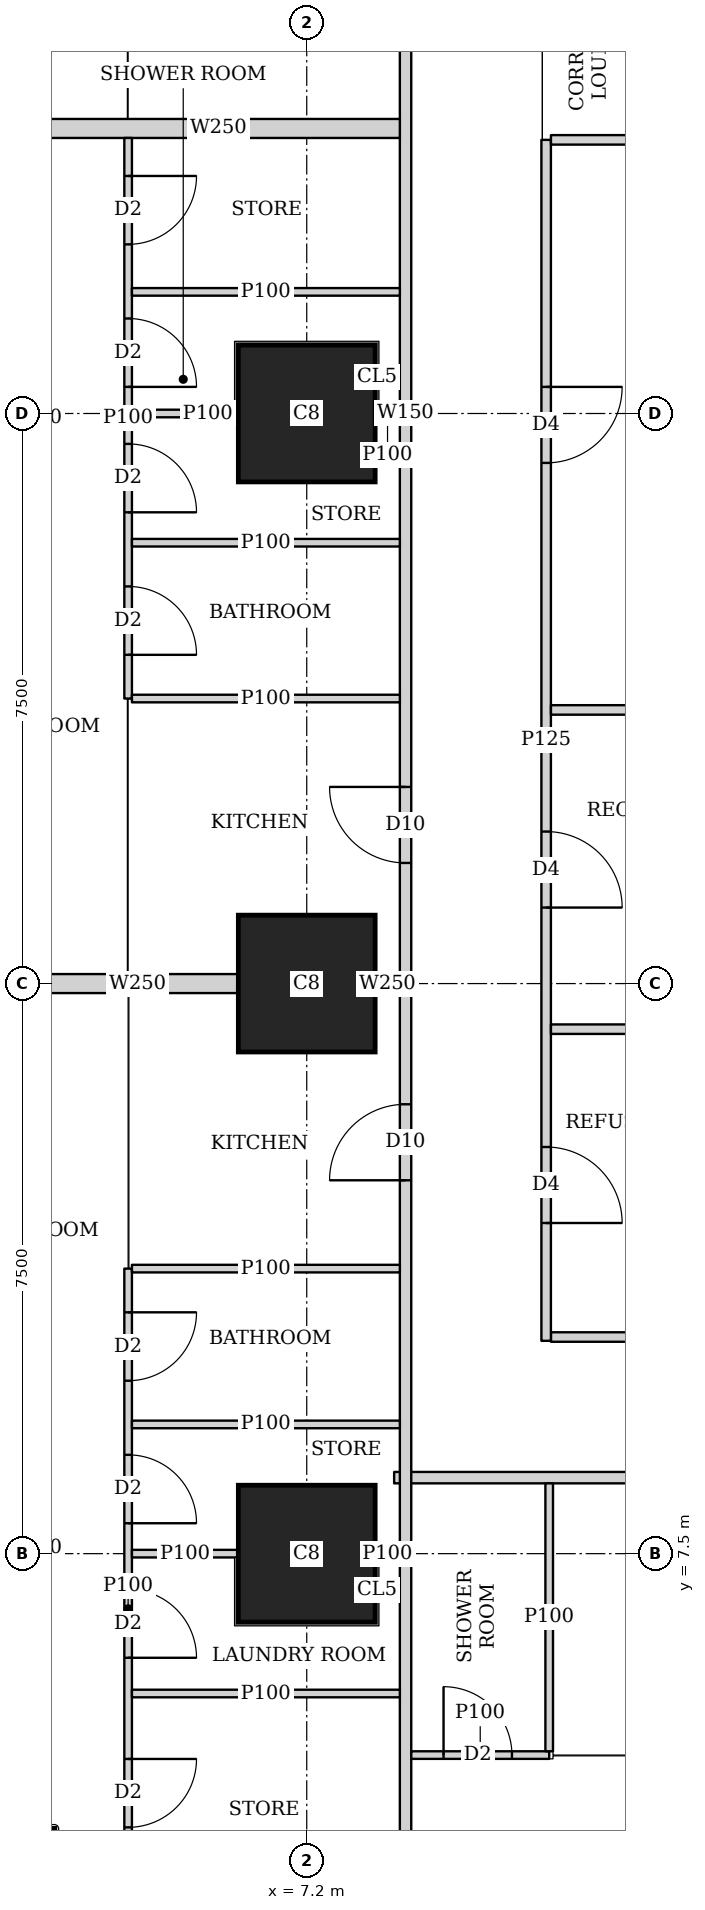
"""IFC4 building model, lengths in metres.
Left out: names, types, materials, properties, quantities, classifications, styles, units other than length and angle.
Written with IfcOpenShell. Run it as: python <this file> out.ifc"""

import sys

from ifc_helpers import new_model, si_unit, direction, frame, frame_2d, origin, origin_2d, place, context, subcontext, project, spatial, rectangle, extrude, element, fill, save


model = new_model("IFC4")
c1 = context("Model", 3, precision=1e-05, world=origin(), true_north=direction((0.0, 1.0)))
c2 = subcontext(c1, "Body", "Model", "MODEL_VIEW")
j1 = project(units=[si_unit("LENGTHUNIT", "METRE"), si_unit("PLANEANGLEUNIT", "RADIAN")], contexts=[c1])
p1 = place(None, origin())
s1 = spatial("IfcSite", under=j1, at=p1, CompositionType="ELEMENT")
p2 = place(p1, origin())
s2 = spatial("IfcBuilding", under=s1, at=p2, CompositionType="ELEMENT")
p3 = place(p2, frame((0.0, 0.0, 23.75)))
s3 = spatial("IfcBuildingStorey", under=s2, at=p3, CompositionType="ELEMENT", Elevation=23.75)
p4 = place(p3, frame((2.186, 2.186, 0.0), z_axis=(0.0, 0.0, 1.0), x_axis=(1.0, 0.0, 0.0)))
e1 = element("IfcColumn", 1, at=p4, inside=s3, PredefinedType="COLUMN", context=c2, shape_type="SweptSolid", body=[
    extrude(rectangle(XDim=3.4, YDim=3.4, at=origin_2d()), origin(), (0.0, 0.0, 1.0), 3.75),
])
for number, where, z_axis, x_axis in (
    (2, (7.2, 7.5, 0.0), (0.0, 0.0, 1.0), (1.0, 0.0, 0.0)),
    (3, (7.2, 15.0, 0.0), (0.0, 0.0, 1.0), (1.0, 0.0, 0.0)),
    (4, (7.2, 22.5, 0.0), (0.0, 0.0, 1.0), (1.0, 0.0, 0.0)),
):
    element("IfcColumn", number, at=place(p3, frame(where, z_axis=z_axis, x_axis=x_axis)), inside=s3, PredefinedType="COLUMN", context=c2, shape_type="SweptSolid", body=[
        extrude(rectangle(XDim=1.8, YDim=1.8, at=origin_2d()), origin(), (0.0, 0.0, 1.0), 3.75),
    ])
p5 = place(p3, frame((8.5, 2.626, 0.0), z_axis=(0.0, 0.0, 1.0), x_axis=(0.0, 1.0, 0.0)))
e5 = element("IfcWall", 5, at=p5, inside=s3, PredefinedType="SOLIDWALL", context=c2, shape_type="SweptSolid", body=[
    extrude(rectangle(XDim=39.773, YDim=0.15, at=frame_2d((19.886, 0.0))), origin(), (0.0, 0.0, 1.0), 2.05),
])
p6 = place(p5, frame((9.786, 0.0, 0.0)))
e6 = element("IfcOpeningElement", 6, at=p6, cuts=e5, PredefinedType="OPENING", context=c2, shape_type="SweptSolid", body=[
    extrude(rectangle(XDim=1.0, YDim=2.0, at=frame_2d((0.5, 1.0))), frame((0.0, 0.085, 0.0), z_axis=(0.0, -1.0, 0.0), x_axis=(1.0, 0.0, 0.0)), (0.0, 0.0, 1.0), 0.17),
])
p7 = place(p5, frame((13.961, 0.0, 0.0)))
e7 = element("IfcOpeningElement", 7, at=p7, cuts=e5, PredefinedType="OPENING", context=c2, shape_type="SweptSolid", body=[
    extrude(rectangle(XDim=1.0, YDim=2.0, at=frame_2d((0.5, 1.0))), frame((0.0, 0.085, 0.0), z_axis=(0.0, -1.0, 0.0), x_axis=(1.0, 0.0, 0.0)), (0.0, 0.0, 1.0), 0.17),
])
p8 = place(p5, frame((24.787, 0.0, 0.0)))
e8 = element("IfcOpeningElement", 8, at=p8, cuts=e5, PredefinedType="OPENING", context=c2, shape_type="SweptSolid", body=[
    extrude(rectangle(XDim=1.0, YDim=2.0, at=frame_2d((0.5, 1.0))), frame((0.0, 0.085, 0.0), z_axis=(0.0, -1.0, 0.0), x_axis=(1.0, 0.0, 0.0)), (0.0, 0.0, 1.0), 0.17),
])
p9 = place(p5, frame((32.287, 0.0, 0.0)))
e9 = element("IfcOpeningElement", 9, at=p9, cuts=e5, PredefinedType="OPENING", context=c2, shape_type="SweptSolid", body=[
    extrude(rectangle(XDim=1.0, YDim=2.0, at=frame_2d((0.5, 1.0))), frame((0.0, 0.085, 0.0), z_axis=(0.0, -1.0, 0.0), x_axis=(1.0, 0.0, 0.0)), (0.0, 0.0, 1.0), 0.17),
])
p10 = place(p3, frame((40.054, 8.5, 0.0), z_axis=(0.0, 0.0, 1.0), x_axis=(-1.0, 0.0, 0.0)))
e10 = element("IfcWall", 10, at=p10, inside=s3, PredefinedType="SOLIDWALL", context=c2, shape_type="SweptSolid", body=[
    extrude(rectangle(XDim=31.704, YDim=0.15, at=frame_2d((15.852, 0.0))), origin(), (0.0, 0.0, 1.0), 3.5),
])
p11 = place(p10, frame((27.321, 0.0, 0.0)))
e11 = element("IfcOpeningElement", 11, at=p11, cuts=e10, PredefinedType="OPENING", context=c2, shape_type="SweptSolid", body=[
    extrude(rectangle(XDim=1.0, YDim=2.1, at=frame_2d((0.5, 1.05))), frame((0.0, 0.085, 0.0), z_axis=(0.0, -1.0, 0.0), x_axis=(1.0, 0.0, 0.0)), (0.0, 0.0, 1.0), 0.17),
])
p12 = place(p10, frame((23.054, 0.0, 0.0)))
e12 = element("IfcOpeningElement", 12, at=p12, cuts=e10, PredefinedType="OPENING", context=c2, shape_type="SweptSolid", body=[
    extrude(rectangle(XDim=1.0, YDim=2.1, at=frame_2d((0.5, 1.05))), frame((0.0, 0.085, 0.0), z_axis=(0.0, -1.0, 0.0), x_axis=(1.0, 0.0, 0.0)), (0.0, 0.0, 1.0), 0.17),
])
p13 = place(p10, frame((15.754, 0.0, 0.0)))
e13 = element("IfcOpeningElement", 13, at=p13, cuts=e10, PredefinedType="OPENING", context=c2, shape_type="SweptSolid", body=[
    extrude(rectangle(XDim=1.0, YDim=2.1, at=frame_2d((0.5, 1.05))), frame((0.0, 0.085, 0.0), z_axis=(0.0, -1.0, 0.0), x_axis=(1.0, 0.0, 0.0)), (0.0, 0.0, 1.0), 0.17),
])
p14 = place(p10, frame((5.754, 0.0, 0.0)))
e14 = element("IfcOpeningElement", 14, at=p14, cuts=e10, PredefinedType="OPENING", context=c2, shape_type="SweptSolid", body=[
    extrude(rectangle(XDim=1.0, YDim=2.1, at=frame_2d((0.5, 1.05))), frame((0.0, 0.085, 0.0), z_axis=(0.0, -1.0, 0.0), x_axis=(1.0, 0.0, 0.0)), (0.0, 0.0, 1.0), 0.17),
])
p15 = place(p3, frame((4.85, 2.299, 0.0), z_axis=(0.0, 0.0, 1.0), x_axis=(0.0, 1.0, 0.0)))
e15 = element("IfcWall", 15, at=p15, inside=s3, PredefinedType="PARTITIONING", context=c2, shape_type="SweptSolid", body=[
    extrude(rectangle(XDim=8.951, YDim=0.1, at=frame_2d((4.476, 0.0))), origin(), (0.0, 0.0, 1.0), 3.5),
])
p16 = place(p15, frame((7.476, 0.0, 0.0)))
e16 = element("IfcOpeningElement", 16, at=p16, cuts=e15, PredefinedType="OPENING", context=c2, shape_type="SweptSolid", body=[
    extrude(rectangle(XDim=0.9, YDim=2.1, at=frame_2d((0.45, 1.05))), frame((0.0, 0.06, 0.0), z_axis=(0.0, -1.0, 0.0), x_axis=(1.0, 0.0, 0.0)), (0.0, 0.0, 1.0), 0.12),
])
p17 = place(p15, frame((3.831, 0.0, 0.0)))
e17 = element("IfcOpeningElement", 17, at=p17, cuts=e15, PredefinedType="OPENING", context=c2, shape_type="SweptSolid", body=[
    extrude(rectangle(XDim=0.9, YDim=2.1, at=frame_2d((0.45, 1.05))), frame((0.0, 0.06, 0.0), z_axis=(0.0, -1.0, 0.0), x_axis=(1.0, 0.0, 0.0)), (0.0, 0.0, 1.0), 0.12),
])
p18 = place(p15, frame((5.601, 0.0, 0.0)))
e18 = element("IfcOpeningElement", 18, at=p18, cuts=e15, PredefinedType="OPENING", context=c2, shape_type="SweptSolid", body=[
    extrude(rectangle(XDim=0.9, YDim=2.1, at=frame_2d((0.45, 1.05))), frame((0.0, 0.06, 0.0), z_axis=(0.0, -1.0, 0.0), x_axis=(1.0, 0.0, 0.0)), (0.0, 0.0, 1.0), 0.12),
])
p19 = place(p15, frame((1.6, 0.0, 0.0)))
e19 = element("IfcOpeningElement", 19, at=p19, cuts=e15, PredefinedType="OPENING", context=c2, shape_type="SweptSolid", body=[
    extrude(rectangle(XDim=0.9, YDim=2.1, at=frame_2d((0.45, 1.05))), frame((0.0, 0.06, 0.0), z_axis=(0.0, -1.0, 0.0), x_axis=(1.0, 0.0, 0.0)), (0.0, 0.0, 1.0), 0.12),
])
p20 = place(p3, frame((4.9, 7.5, 0.0), z_axis=(0.0, 0.0, 1.0), x_axis=(1.0, 0.0, 0.0)))
e20 = element("IfcWall", 20, at=p20, inside=s3, PredefinedType="PARTITIONING", context=c2, shape_type="SweptSolid", body=[
    extrude(rectangle(XDim=1.399, YDim=0.1, at=frame_2d((0.7, 0.0))), origin(), (0.0, 0.0, 1.0), 3.5),
])
p21 = place(p3, frame((8.101, 7.5, 0.0), z_axis=(0.0, 0.0, 1.0), x_axis=(1.0, 0.0, 0.0)))
e21 = element("IfcWall", 21, at=p21, inside=s3, PredefinedType="PARTITIONING", context=c2, shape_type="SweptSolid", body=[
    extrude(rectangle(XDim=0.324, YDim=0.1, at=frame_2d((0.162, 0.0))), origin(), (0.0, 0.0, 1.0), 3.5),
])
for number, where, z_axis, x_axis in (
    (22, (4.9, 11.25, 0.0), (0.0, 0.0, 1.0), (1.0, 0.0, 0.0)),
    (23, (4.9, 9.2, 0.0), (0.0, 0.0, 1.0), (1.0, 0.0, 0.0)),
    (24, (4.9, 5.66, 0.0), (0.0, 0.0, 1.0), (1.0, 0.0, 0.0)),
):
    element("IfcWall", number, at=place(p3, frame(where, z_axis=z_axis, x_axis=x_axis)), inside=s3, PredefinedType="PARTITIONING", context=c2, shape_type="SweptSolid", body=[
        extrude(rectangle(XDim=3.525, YDim=0.1, at=frame_2d((1.763, 0.0))), origin(), (0.0, 0.0, 1.0), 3.5),
    ])
p22 = place(p3, frame((4.85, 18.75, 0.0), z_axis=(0.0, 0.0, 1.0), x_axis=(0.0, 1.0, 0.0)))
e25 = element("IfcWall", 25, at=p22, inside=s3, PredefinedType="PARTITIONING", context=c2, shape_type="SweptSolid", body=[
    extrude(rectangle(XDim=7.375, YDim=0.1, at=frame_2d((3.688, 0.0))), origin(), (0.0, 0.0, 1.0), 3.5),
])
p23 = place(p22, frame((0.575, 0.0, 0.0)))
e26 = element("IfcOpeningElement", 26, at=p23, cuts=e25, PredefinedType="OPENING", context=c2, shape_type="SweptSolid", body=[
    extrude(rectangle(XDim=0.9, YDim=2.1, at=frame_2d((0.45, 1.05))), frame((0.0, 0.06, 0.0), z_axis=(0.0, -1.0, 0.0), x_axis=(1.0, 0.0, 0.0)), (0.0, 0.0, 1.0), 0.12),
])
p24 = place(p22, frame((4.1, 0.0, 0.0)))
e27 = element("IfcOpeningElement", 27, at=p24, cuts=e25, PredefinedType="OPENING", context=c2, shape_type="SweptSolid", body=[
    extrude(rectangle(XDim=0.9, YDim=2.1, at=frame_2d((0.45, 1.05))), frame((0.0, 0.06, 0.0), z_axis=(0.0, -1.0, 0.0), x_axis=(1.0, 0.0, 0.0)), (0.0, 0.0, 1.0), 0.12),
])
p25 = place(p22, frame((2.45, 0.0, 0.0)))
e28 = element("IfcOpeningElement", 28, at=p25, cuts=e25, PredefinedType="OPENING", context=c2, shape_type="SweptSolid", body=[
    extrude(rectangle(XDim=0.9, YDim=2.1, at=frame_2d((0.45, 1.05))), frame((0.0, 0.06, 0.0), z_axis=(0.0, -1.0, 0.0), x_axis=(1.0, 0.0, 0.0)), (0.0, 0.0, 1.0), 0.12),
])
p26 = place(p22, frame((5.975, 0.0, 0.0)))
e29 = element("IfcOpeningElement", 29, at=p26, cuts=e25, PredefinedType="OPENING", context=c2, shape_type="SweptSolid", body=[
    extrude(rectangle(XDim=0.9, YDim=2.1, at=frame_2d((0.45, 1.05))), frame((0.0, 0.06, 0.0), z_axis=(0.0, -1.0, 0.0), x_axis=(1.0, 0.0, 0.0)), (0.0, 0.0, 1.0), 0.12),
])
p27 = place(p3, frame((4.9, 18.75, 0.0), z_axis=(0.0, 0.0, 1.0), x_axis=(1.0, 0.0, 0.0)))
e30 = element("IfcWall", 30, at=p27, inside=s3, PredefinedType="PARTITIONING", context=c2, shape_type="SweptSolid", body=[
    extrude(rectangle(XDim=3.525, YDim=0.1, at=frame_2d((1.763, 0.0))), origin(), (0.0, 0.0, 1.0), 3.5),
])
p28 = place(p3, frame((4.9, 22.5, 0.0), z_axis=(0.0, 0.0, 1.0), x_axis=(1.0, 0.0, 0.0)))
e31 = element("IfcWall", 31, at=p28, inside=s3, PredefinedType="PARTITIONING", context=c2, shape_type="SweptSolid", body=[
    extrude(rectangle(XDim=1.399, YDim=0.1, at=frame_2d((0.7, 0.0))), origin(), (0.0, 0.0, 1.0), 3.5),
])
p29 = place(p3, frame((8.101, 22.5, 0.0), z_axis=(0.0, 0.0, 1.0), x_axis=(1.0, 0.0, 0.0)))
e32 = element("IfcWall", 32, at=p29, inside=s3, PredefinedType="PARTITIONING", context=c2, shape_type="SweptSolid", body=[
    extrude(rectangle(XDim=0.324, YDim=0.1, at=frame_2d((0.162, 0.0))), origin(), (0.0, 0.0, 1.0), 3.5),
])
for number, where, z_axis, x_axis in (
    (33, (4.9, 20.8, 0.0), (0.0, 0.0, 1.0), (1.0, 0.0, 0.0)),
    (34, (4.9, 24.1, 0.0), (0.0, 0.0, 1.0), (1.0, 0.0, 0.0)),
):
    element("IfcWall", number, at=place(p3, frame(where, z_axis=z_axis, x_axis=x_axis)), inside=s3, PredefinedType="PARTITIONING", context=c2, shape_type="SweptSolid", body=[
        extrude(rectangle(XDim=3.525, YDim=0.1, at=frame_2d((1.763, 0.0))), origin(), (0.0, 0.0, 1.0), 3.5),
    ])
p30 = place(p3, frame((3.65, 15.0, 0.0), z_axis=(0.0, 0.0, 1.0), x_axis=(1.0, 0.0, 0.0)))
e35 = element("IfcWall", 35, at=p30, inside=s3, PredefinedType="SOLIDWALL", context=c2, shape_type="SweptSolid", body=[
    extrude(rectangle(XDim=2.649, YDim=0.25, at=frame_2d((1.325, 0.0))), origin(), (0.0, 0.0, 1.0), 3.5),
])
p31 = place(p3, frame((8.101, 15.0, 0.0), z_axis=(0.0, 0.0, 1.0), x_axis=(1.0, 0.0, 0.0)))
e36 = element("IfcWall", 36, at=p31, inside=s3, PredefinedType="SOLIDWALL", context=c2, shape_type="SweptSolid", body=[
    extrude(rectangle(XDim=0.324, YDim=0.25, at=frame_2d((0.162, 0.0))), origin(), (0.0, 0.0, 1.0), 3.5),
])
p32 = place(p3, frame((3.65, 26.25, 0.0), z_axis=(0.0, 0.0, 1.0), x_axis=(1.0, 0.0, 0.0)))
e37 = element("IfcWall", 37, at=p32, inside=s3, PredefinedType="SOLIDWALL", context=c2, shape_type="SweptSolid", body=[
    extrude(rectangle(XDim=4.775, YDim=0.25, at=frame_2d((2.388, 0.0))), origin(), (0.0, 0.0, 1.0), 3.5),
])
p33 = place(p3, frame((10.39, 4.85, 0.0), z_axis=(0.0, 0.0, 1.0), x_axis=(-1.0, 0.0, 0.0)))
e38 = element("IfcWall", 38, at=p33, inside=s3, PredefinedType="PARTITIONING", context=c2, shape_type="SweptSolid", body=[
    extrude(rectangle(XDim=1.815, YDim=0.1, at=frame_2d((0.907, 0.0))), origin(), (0.0, 0.0, 1.0), 3.5),
])
p34 = place(p33, frame((0.49, 0.0, 0.0)))
e39 = element("IfcOpeningElement", 39, at=p34, cuts=e38, PredefinedType="OPENING", context=c2, shape_type="SweptSolid", body=[
    extrude(rectangle(XDim=0.9, YDim=2.1, at=frame_2d((0.45, 1.05))), frame((0.0, 0.06, 0.0), z_axis=(0.0, -1.0, 0.0), x_axis=(1.0, 0.0, 0.0)), (0.0, 0.0, 1.0), 0.12),
])
p35 = place(p3, frame((10.39, 4.9, 0.0), z_axis=(0.0, 0.0, 1.0), x_axis=(0.0, 1.0, 0.0)))
e40 = element("IfcWall", 40, at=p35, inside=s3, PredefinedType="PARTITIONING", context=c2, shape_type="SweptSolid", body=[
    extrude(rectangle(XDim=3.525, YDim=0.1, at=frame_2d((1.763, 0.0))), origin(), (0.0, 0.0, 1.0), 3.5),
])
p36 = place(p3, frame((10.35, 10.3, 0.0), z_axis=(0.0, 0.0, 1.0), x_axis=(0.0, 1.0, 0.0)))
e41 = element("IfcWall", 41, at=p36, inside=s3, PredefinedType="PARTITIONING", context=c2, shape_type="SweptSolid", body=[
    extrude(rectangle(XDim=15.8, YDim=0.125, at=frame_2d((7.9, 0.0))), origin(), (0.0, 0.0, 1.0), 3.5),
])
p37 = place(p36, frame((1.55, 0.0, 0.0)))
e42 = element("IfcOpeningElement", 42, at=p37, cuts=e41, PredefinedType="OPENING", context=c2, shape_type="SweptSolid", body=[
    extrude(rectangle(XDim=1.0, YDim=2.1, at=frame_2d((0.5, 1.05))), frame((0.0, 0.073, 0.0), z_axis=(0.0, -1.0, 0.0), x_axis=(1.0, 0.0, 0.0)), (0.0, 0.0, 1.0), 0.145),
])
p38 = place(p36, frame((5.7, 0.0, 0.0)))
e43 = element("IfcOpeningElement", 43, at=p38, cuts=e41, PredefinedType="OPENING", context=c2, shape_type="SweptSolid", body=[
    extrude(rectangle(XDim=1.0, YDim=2.1, at=frame_2d((0.5, 1.05))), frame((0.0, 0.073, 0.0), z_axis=(0.0, -1.0, 0.0), x_axis=(1.0, 0.0, 0.0)), (0.0, 0.0, 1.0), 0.145),
])
p39 = place(p36, frame((11.55, 0.0, 0.0)))
e44 = element("IfcOpeningElement", 44, at=p39, cuts=e41, PredefinedType="OPENING", context=c2, shape_type="SweptSolid", body=[
    extrude(rectangle(XDim=1.0, YDim=2.1, at=frame_2d((0.5, 1.05))), frame((0.0, 0.073, 0.0), z_axis=(0.0, -1.0, 0.0), x_axis=(1.0, 0.0, 0.0)), (0.0, 0.0, 1.0), 0.145),
])
p40 = place(p3, frame((10.413, 14.4, 0.0), z_axis=(0.0, 0.0, 1.0), x_axis=(1.0, 0.0, 0.0)))
e45 = element("IfcWall", 45, at=p40, inside=s3, PredefinedType="PARTITIONING", context=c2, shape_type="SweptSolid", body=[
    extrude(rectangle(XDim=3.475, YDim=0.125, at=frame_2d((1.737, 0.0))), origin(), (0.0, 0.0, 1.0), 3.5),
])
for number, where, z_axis, x_axis in (
    (46, (10.413, 18.6, 0.0), (0.0, 0.0, 1.0), (1.0, 0.0, 0.0)),
    (47, (10.413, 26.1, 0.0), (0.0, 0.0, 1.0), (1.0, 0.0, 0.0)),
):
    element("IfcWall", number, at=place(p3, frame(where, z_axis=z_axis, x_axis=x_axis)), inside=s3, PredefinedType="PARTITIONING", context=c2, shape_type="SweptSolid", body=[
        extrude(rectangle(XDim=3.537, YDim=0.125, at=frame_2d((1.769, 0.0))), origin(), (0.0, 0.0, 1.0), 3.5),
    ])
p41 = place(p3, frame((10.413, 10.35, 0.0), z_axis=(0.0, 0.0, 1.0), x_axis=(1.0, 0.0, 0.0)))
e48 = element("IfcWall", 48, at=p41, inside=s3, PredefinedType="PARTITIONING", context=c2, shape_type="SweptSolid", body=[
    extrude(rectangle(XDim=10.837, YDim=0.125, at=frame_2d((5.418, 0.0))), origin(), (0.0, 0.0, 1.0), 3.5),
])
p42 = place(p41, frame((7.582, 0.0, 0.0)))
e49 = element("IfcOpeningElement", 49, at=p42, cuts=e48, PredefinedType="OPENING", context=c2, shape_type="SweptSolid", body=[
    extrude(rectangle(XDim=1.8, YDim=2.1, at=frame_2d((0.9, 1.05))), frame((0.0, 0.073, 0.0), z_axis=(0.0, -1.0, 0.0), x_axis=(1.0, 0.0, 0.0)), (0.0, 0.0, 1.0), 0.145),
])
p43 = place(p16, origin())
e50 = element("IfcDoor", 50, at=p43, inside=s3, OperationType="SINGLE_SWING_LEFT", PredefinedType="DOOR", context=c2, shape_type="SweptSolid", body=[
    extrude(rectangle(XDim=0.9, YDim=2.1, at=frame_2d((0.45, 1.05))), frame((0.0, 0.025, 0.0), z_axis=(0.0, -1.0, 0.0), x_axis=(1.0, 0.0, 0.0)), (0.0, 0.0, 1.0), 0.05),
])
fill(e16, e50)
p44 = place(p17, origin())
e51 = element("IfcDoor", 51, at=p44, inside=s3, OperationType="SINGLE_SWING_RIGHT", PredefinedType="DOOR", context=c2, shape_type="SweptSolid", body=[
    extrude(rectangle(XDim=0.9, YDim=2.1, at=frame_2d((0.45, 1.05))), frame((0.0, 0.025, 0.0), z_axis=(0.0, -1.0, 0.0), x_axis=(1.0, 0.0, 0.0)), (0.0, 0.0, 1.0), 0.05),
])
fill(e17, e51)
p45 = place(p18, origin())
e52 = element("IfcDoor", 52, at=p45, inside=s3, OperationType="SINGLE_SWING_RIGHT", PredefinedType="DOOR", context=c2, shape_type="SweptSolid", body=[
    extrude(rectangle(XDim=0.9, YDim=2.1, at=frame_2d((0.45, 1.05))), frame((0.0, 0.025, 0.0), z_axis=(0.0, -1.0, 0.0), x_axis=(1.0, 0.0, 0.0)), (0.0, 0.0, 1.0), 0.05),
])
fill(e18, e52)
p46 = place(p19, origin())
e53 = element("IfcDoor", 53, at=p46, inside=s3, OperationType="SINGLE_SWING_LEFT", PredefinedType="DOOR", context=c2, shape_type="SweptSolid", body=[
    extrude(rectangle(XDim=0.9, YDim=2.1, at=frame_2d((0.45, 1.05))), frame((0.0, 0.025, 0.0), z_axis=(0.0, -1.0, 0.0), x_axis=(1.0, 0.0, 0.0)), (0.0, 0.0, 1.0), 0.05),
])
fill(e19, e53)
p47 = place(p6, origin())
e54 = element("IfcDoor", 54, at=p47, inside=s3, OperationType="SINGLE_SWING_LEFT", PredefinedType="DOOR", context=c2, shape_type="SweptSolid", body=[
    extrude(rectangle(XDim=1.0, YDim=2.0, at=frame_2d((0.5, 1.0))), frame((0.0, 0.025, 0.0), z_axis=(0.0, -1.0, 0.0), x_axis=(1.0, 0.0, 0.0)), (0.0, 0.0, 1.0), 0.05),
])
fill(e6, e54)
p48 = place(p23, origin())
e55 = element("IfcDoor", 55, at=p48, inside=s3, OperationType="SINGLE_SWING_RIGHT", PredefinedType="DOOR", context=c2, shape_type="SweptSolid", body=[
    extrude(rectangle(XDim=0.9, YDim=2.1, at=frame_2d((0.45, 1.05))), frame((0.0, 0.025, 0.0), z_axis=(0.0, -1.0, 0.0), x_axis=(1.0, 0.0, 0.0)), (0.0, 0.0, 1.0), 0.05),
])
fill(e26, e55)
p49 = place(p24, origin())
e56 = element("IfcDoor", 56, at=p49, inside=s3, OperationType="SINGLE_SWING_RIGHT", PredefinedType="DOOR", context=c2, shape_type="SweptSolid", body=[
    extrude(rectangle(XDim=0.9, YDim=2.1, at=frame_2d((0.45, 1.05))), frame((0.0, 0.025, 0.0), z_axis=(0.0, -1.0, 0.0), x_axis=(1.0, 0.0, 0.0)), (0.0, 0.0, 1.0), 0.05),
])
fill(e27, e56)
p50 = place(p25, origin())
e57 = element("IfcDoor", 57, at=p50, inside=s3, OperationType="SINGLE_SWING_RIGHT", PredefinedType="DOOR", context=c2, shape_type="SweptSolid", body=[
    extrude(rectangle(XDim=0.9, YDim=2.1, at=frame_2d((0.45, 1.05))), frame((0.0, 0.025, 0.0), z_axis=(0.0, -1.0, 0.0), x_axis=(1.0, 0.0, 0.0)), (0.0, 0.0, 1.0), 0.05),
])
fill(e28, e57)
p51 = place(p26, origin())
e58 = element("IfcDoor", 58, at=p51, inside=s3, OperationType="SINGLE_SWING_LEFT", PredefinedType="DOOR", context=c2, shape_type="SweptSolid", body=[
    extrude(rectangle(XDim=0.9, YDim=2.1, at=frame_2d((0.45, 1.05))), frame((0.0, 0.025, 0.0), z_axis=(0.0, -1.0, 0.0), x_axis=(1.0, 0.0, 0.0)), (0.0, 0.0, 1.0), 0.05),
])
fill(e29, e58)
p52 = place(p7, origin())
e59 = element("IfcDoor", 59, at=p52, inside=s3, OperationType="SINGLE_SWING_RIGHT", PredefinedType="DOOR", context=c2, shape_type="SweptSolid", body=[
    extrude(rectangle(XDim=1.0, YDim=2.0, at=frame_2d((0.5, 1.0))), frame((0.0, 0.025, 0.0), z_axis=(0.0, -1.0, 0.0), x_axis=(1.0, 0.0, 0.0)), (0.0, 0.0, 1.0), 0.05),
])
fill(e7, e59)
p53 = place(p34, origin())
e60 = element("IfcDoor", 60, at=p53, inside=s3, OperationType="SINGLE_SWING_LEFT", PredefinedType="DOOR", context=c2, shape_type="SweptSolid", body=[
    extrude(rectangle(XDim=0.9, YDim=2.1, at=frame_2d((0.45, 1.05))), frame((0.0, 0.025, 0.0), z_axis=(0.0, -1.0, 0.0), x_axis=(1.0, 0.0, 0.0)), (0.0, 0.0, 1.0), 0.05),
])
fill(e39, e60)
p54 = place(p37, origin())
e61 = element("IfcDoor", 61, at=p54, inside=s3, OperationType="SINGLE_SWING_RIGHT", PredefinedType="DOOR", context=c2, shape_type="SweptSolid", body=[
    extrude(rectangle(XDim=1.0, YDim=2.1, at=frame_2d((0.5, 1.05))), frame((0.0, 0.025, 0.0), z_axis=(0.0, -1.0, 0.0), x_axis=(1.0, 0.0, 0.0)), (0.0, 0.0, 1.0), 0.05),
])
fill(e42, e61)
p55 = place(p38, origin())
e62 = element("IfcDoor", 62, at=p55, inside=s3, OperationType="SINGLE_SWING_RIGHT", PredefinedType="DOOR", context=c2, shape_type="SweptSolid", body=[
    extrude(rectangle(XDim=1.0, YDim=2.1, at=frame_2d((0.5, 1.05))), frame((0.0, 0.025, 0.0), z_axis=(0.0, -1.0, 0.0), x_axis=(1.0, 0.0, 0.0)), (0.0, 0.0, 1.0), 0.05),
])
fill(e43, e62)
p56 = place(p39, origin())
e63 = element("IfcDoor", 63, at=p56, inside=s3, OperationType="SINGLE_SWING_LEFT", PredefinedType="DOOR", context=c2, shape_type="SweptSolid", body=[
    extrude(rectangle(XDim=1.0, YDim=2.1, at=frame_2d((0.5, 1.05))), frame((0.0, 0.025, 0.0), z_axis=(0.0, -1.0, 0.0), x_axis=(1.0, 0.0, 0.0)), (0.0, 0.0, 1.0), 0.05),
])
fill(e44, e63)
save(model, sys.argv[1])
